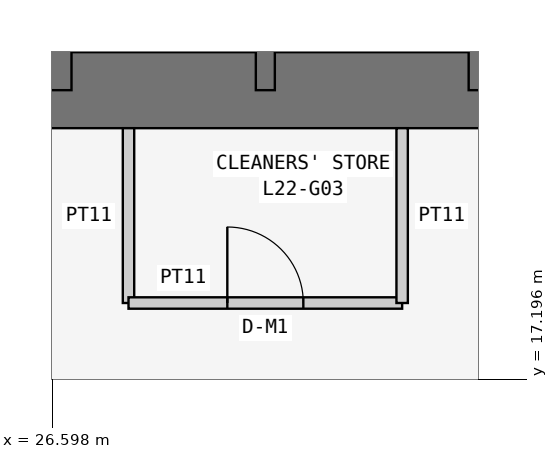
"""IFC4 building model, lengths in metres.
Left out: names, types, materials, properties, quantities, classifications, styles, units other than length and angle.
Written with IfcOpenShell. Run it as: python <this file> out.ifc"""

import sys

from ifc_helpers import new_model, si_unit, direction, frame, frame_2d, origin, place, context, subcontext, project, spatial, rectangle, extrude, element, fill, save


model = new_model("IFC4")
c1 = context("Model", 3, precision=1e-05, world=origin(), true_north=direction((0.0, 1.0)))
c2 = subcontext(c1, "Body", "Model", "MODEL_VIEW")
j1 = project(units=[si_unit("LENGTHUNIT", "METRE"), si_unit("PLANEANGLEUNIT", "RADIAN")], contexts=[c1])
p1 = place(None, origin())
s1 = spatial("IfcSite", under=j1, at=p1, CompositionType="ELEMENT")
p2 = place(p1, origin())
s2 = spatial("IfcBuilding", under=s1, at=p2, CompositionType="ELEMENT")
p3 = place(p2, frame((0.0, 0.0, 88.5)))
s3 = spatial("IfcBuildingStorey", under=s2, at=p3, CompositionType="ELEMENT", Elevation=88.5)
p4 = place(p3, frame((21.0, 21.0, 0.0), z_axis=(0.0, 0.0, 1.0), x_axis=(1.0, 0.0, 0.0)))
e1 = element("IfcWall", 1, at=p4, inside=s3, PredefinedType="SHEAR", context=c2, shape_type="SweptSolid", body=[
    extrude(rectangle(XDim=17.3, YDim=1.0, at=frame_2d((8.65, 0.0))), origin(), (0.0, 0.0, 1.0), 3.6),
])
p5 = place(p3, frame((26.6, 21.0, 0.0), z_axis=(0.0, 0.0, 1.0), x_axis=(0.0, 1.0, 0.0)))
e2 = element("IfcWall", 2, at=p5, inside=s3, PredefinedType="SHEAR", context=c2, shape_type="SweptSolid", body=[
    extrude(rectangle(XDim=16.8, YDim=0.5, at=frame_2d((8.4, 0.0))), origin(), (0.0, 0.0, 1.0), 3.6),
])
p6 = place(p5, frame((10.4, 0.0, 0.0)))
e3 = element("IfcOpeningElement", 3, at=p6, cuts=e2, PredefinedType="OPENING", context=c2, shape_type="SweptSolid", body=[
    extrude(rectangle(XDim=1.2, YDim=2.1, at=frame_2d((0.6, 1.05))), frame((0.0, 0.26, 0.0), z_axis=(0.0, -1.0, 0.0), x_axis=(1.0, 0.0, 0.0)), (0.0, 0.0, 1.0), 0.52),
])
for number, where, z_axis, x_axis in (
    (4, (29.4, 21.0, 0.0), (0.0, 0.0, 1.0), (0.0, 1.0, 0.0)),
    (5, (32.2, 21.0, 0.0), (0.0, 0.0, 1.0), (0.0, 1.0, 0.0)),
):
    element("IfcWall", number, at=place(p3, frame(where, z_axis=z_axis, x_axis=x_axis)), inside=s3, PredefinedType="SHEAR", context=c2, shape_type="SweptSolid", body=[
        extrude(rectangle(XDim=3.2, YDim=0.25, at=frame_2d((1.6, 0.0))), origin(), (0.0, 0.0, 1.0), 3.6),
    ])
p7 = place(p3, frame((27.6, 20.5, 0.0), z_axis=(0.0, 0.0, 1.0), x_axis=(0.0, -1.0, 0.0)))
e6 = element("IfcWall", 6, at=p7, inside=s3, PredefinedType="PARTITIONING", context=c2, shape_type="SweptSolid", body=[
    extrude(rectangle(XDim=2.3, YDim=0.15, at=frame_2d((1.15, 0.0))), origin(), (0.0, 0.0, 1.0), 3.45),
])
p8 = place(p3, frame((27.6, 18.2, 0.0), z_axis=(0.0, 0.0, 1.0), x_axis=(1.0, 0.0, 0.0)))
e7 = element("IfcWall", 7, at=p8, inside=s3, PredefinedType="PARTITIONING", context=c2, shape_type="SweptSolid", body=[
    extrude(rectangle(XDim=3.6, YDim=0.15, at=frame_2d((1.8, 0.0))), origin(), (0.0, 0.0, 1.0), 3.45),
])
p9 = place(p8, frame((1.3, 0.0, 0.0)))
e8 = element("IfcOpeningElement", 8, at=p9, cuts=e7, PredefinedType="OPENING", context=c2, shape_type="SweptSolid", body=[
    extrude(rectangle(XDim=1.0, YDim=2.1, at=frame_2d((0.5, 1.05))), frame((0.0, 0.085, 0.0), z_axis=(0.0, -1.0, 0.0), x_axis=(1.0, 0.0, 0.0)), (0.0, 0.0, 1.0), 0.17),
])
p10 = place(p3, frame((31.2, 18.2, 0.0), z_axis=(0.0, 0.0, 1.0), x_axis=(0.0, 1.0, 0.0)))
e9 = element("IfcWall", 9, at=p10, inside=s3, PredefinedType="PARTITIONING", context=c2, shape_type="SweptSolid", body=[
    extrude(rectangle(XDim=2.3, YDim=0.15, at=frame_2d((1.15, 0.0))), origin(), (0.0, 0.0, 1.0), 3.45),
])
p11 = place(p9, origin())
e10 = element("IfcDoor", 10, at=p11, inside=s3, OperationType="SINGLE_SWING_LEFT", PredefinedType="DOOR", context=c2, shape_type="SweptSolid", body=[
    extrude(rectangle(XDim=1.0, YDim=2.1, at=frame_2d((0.5, 1.05))), frame((0.0, 0.025, 0.0), z_axis=(0.0, -1.0, 0.0), x_axis=(1.0, 0.0, 0.0)), (0.0, 0.0, 1.0), 0.05),
])
fill(e8, e10)
save(model, sys.argv[1])
